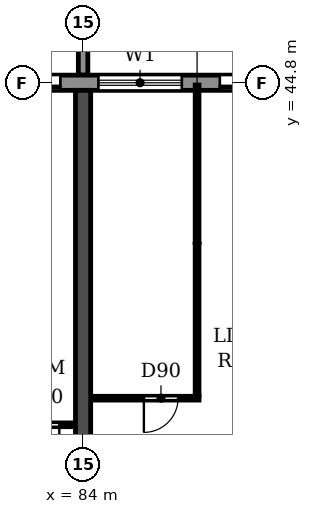
"""IFC4 building model, lengths in metres.
Left out: names, types, materials, properties, quantities, classifications, styles, units other than length and angle.
Written with IfcOpenShell. Run it as: python <this file> out.ifc"""

import sys

from ifc_helpers import new_model, si_unit, direction, frame, frame_2d, origin, place, context, subcontext, project, spatial, polyline, rectangle, outline, extrude, source, transform, mapped, element, fill, save


model = new_model("IFC4")
c1 = context("Model", 3, precision=1e-05, world=origin(), true_north=direction((0.0, 1.0)))
c2 = subcontext(c1, "Body", "Model", "MODEL_VIEW")
j1 = project(units=[si_unit("LENGTHUNIT", "METRE"), si_unit("PLANEANGLEUNIT", "RADIAN")], contexts=[c1])
p1 = place(None, origin())
s1 = spatial("IfcSite", under=j1, at=p1, CompositionType="ELEMENT")
p2 = place(p1, origin())
s2 = spatial("IfcBuilding", under=s1, at=p2, CompositionType="ELEMENT")
p3 = place(p2, frame((0.0, 0.0, 33.3)))
s3 = spatial("IfcBuildingStorey", under=s2, at=p3, CompositionType="ELEMENT", Elevation=33.3)
p4 = place(p3, frame((84.0, 30.55, 0.0), z_axis=(0.0, 0.0, 1.0), x_axis=(0.0, 1.0, 0.0)))
e1 = element("IfcWall", 1, at=p4, inside=s3, PredefinedType="SHEAR", context=c2, shape_type="SweptSolid", body=[
    extrude(rectangle(XDim=14.05, YDim=0.4, at=frame_2d((7.025, 0.0))), origin(), (0.0, 0.0, 1.0), 3.05),
])
p5 = place(p3, frame((97.317, 44.8, 0.0), z_axis=(0.0, 0.0, 1.0), x_axis=(-1.0, 0.0, 0.0)))
e2 = element("IfcWall", 2, at=p5, inside=s3, PredefinedType="STANDARD", context=c2, shape_type="SweptSolid", body=[
    extrude(rectangle(XDim=92.634, YDim=0.4, at=frame_2d((46.317, 0.0))), origin(), (0.0, 0.0, 1.0), 3.05),
])
p6 = place(p5, frame((88.717, 0.0, 0.9)))
e3 = element("IfcOpeningElement", 3, at=p6, cuts=e2, PredefinedType="OPENING", context=c2, shape_type="SweptSolid", body=[
    extrude(rectangle(XDim=2.2, YDim=1.5, at=frame_2d((1.1, 0.75))), frame((0.0, 0.21, 0.0), z_axis=(0.0, -1.0, 0.0), x_axis=(1.0, 0.0, 0.0)), (0.0, 0.0, 1.0), 0.42),
])
p7 = place(p5, frame((85.917, 0.0, 0.0)))
e4 = element("IfcOpeningElement", 4, at=p7, cuts=e2, PredefinedType="OPENING", context=c2, shape_type="SweptSolid", body=[
    extrude(rectangle(XDim=1.8, YDim=2.4, at=frame_2d((0.9, 1.2))), frame((0.0, 0.21, 0.0), z_axis=(0.0, -1.0, 0.0), x_axis=(1.0, 0.0, 0.0)), (0.0, 0.0, 1.0), 0.42),
])
p8 = place(p5, frame((82.717, 0.0, 0.9)))
e5 = element("IfcOpeningElement", 5, at=p8, cuts=e2, PredefinedType="OPENING", context=c2, shape_type="SweptSolid", body=[
    extrude(rectangle(XDim=2.2, YDim=1.5, at=frame_2d((1.1, 0.75))), frame((0.0, 0.21, 0.0), z_axis=(0.0, -1.0, 0.0), x_axis=(1.0, 0.0, 0.0)), (0.0, 0.0, 1.0), 0.42),
])
p9 = place(p5, frame((79.917, 0.0, 0.0)))
e6 = element("IfcOpeningElement", 6, at=p9, cuts=e2, PredefinedType="OPENING", context=c2, shape_type="SweptSolid", body=[
    extrude(rectangle(XDim=1.8, YDim=2.4, at=frame_2d((0.9, 1.2))), frame((0.0, 0.21, 0.0), z_axis=(0.0, -1.0, 0.0), x_axis=(1.0, 0.0, 0.0)), (0.0, 0.0, 1.0), 0.42),
])
p10 = place(p5, frame((76.717, 0.0, 0.9)))
e7 = element("IfcOpeningElement", 7, at=p10, cuts=e2, PredefinedType="OPENING", context=c2, shape_type="SweptSolid", body=[
    extrude(rectangle(XDim=2.2, YDim=1.5, at=frame_2d((1.1, 0.75))), frame((0.0, 0.21, 0.0), z_axis=(0.0, -1.0, 0.0), x_axis=(1.0, 0.0, 0.0)), (0.0, 0.0, 1.0), 0.42),
])
p11 = place(p5, frame((73.717, 0.0, 0.9)))
e8 = element("IfcOpeningElement", 8, at=p11, cuts=e2, PredefinedType="OPENING", context=c2, shape_type="SweptSolid", body=[
    extrude(rectangle(XDim=2.2, YDim=1.5, at=frame_2d((1.1, 0.75))), frame((0.0, 0.21, 0.0), z_axis=(0.0, -1.0, 0.0), x_axis=(1.0, 0.0, 0.0)), (0.0, 0.0, 1.0), 0.42),
])
p12 = place(p5, frame((70.717, 0.0, 0.9)))
e9 = element("IfcOpeningElement", 9, at=p12, cuts=e2, PredefinedType="OPENING", context=c2, shape_type="SweptSolid", body=[
    extrude(rectangle(XDim=2.2, YDim=1.5, at=frame_2d((1.1, 0.75))), frame((0.0, 0.21, 0.0), z_axis=(0.0, -1.0, 0.0), x_axis=(1.0, 0.0, 0.0)), (0.0, 0.0, 1.0), 0.42),
])
p13 = place(p5, frame((67.917, 0.0, 0.0)))
e10 = element("IfcOpeningElement", 10, at=p13, cuts=e2, PredefinedType="OPENING", context=c2, shape_type="SweptSolid", body=[
    extrude(rectangle(XDim=1.8, YDim=2.4, at=frame_2d((0.9, 1.2))), frame((0.0, 0.21, 0.0), z_axis=(0.0, -1.0, 0.0), x_axis=(1.0, 0.0, 0.0)), (0.0, 0.0, 1.0), 0.42),
])
p14 = place(p5, frame((64.717, 0.0, 0.9)))
e11 = element("IfcOpeningElement", 11, at=p14, cuts=e2, PredefinedType="OPENING", context=c2, shape_type="SweptSolid", body=[
    extrude(rectangle(XDim=2.2, YDim=1.5, at=frame_2d((1.1, 0.75))), frame((0.0, 0.21, 0.0), z_axis=(0.0, -1.0, 0.0), x_axis=(1.0, 0.0, 0.0)), (0.0, 0.0, 1.0), 0.42),
])
p15 = place(p5, frame((61.717, 0.0, 0.9)))
e12 = element("IfcOpeningElement", 12, at=p15, cuts=e2, PredefinedType="OPENING", context=c2, shape_type="SweptSolid", body=[
    extrude(rectangle(XDim=2.2, YDim=1.5, at=frame_2d((1.1, 0.75))), frame((0.0, 0.21, 0.0), z_axis=(0.0, -1.0, 0.0), x_axis=(1.0, 0.0, 0.0)), (0.0, 0.0, 1.0), 0.42),
])
p16 = place(p5, frame((58.717, 0.0, 0.9)))
e13 = element("IfcOpeningElement", 13, at=p16, cuts=e2, PredefinedType="OPENING", context=c2, shape_type="SweptSolid", body=[
    extrude(rectangle(XDim=2.2, YDim=1.5, at=frame_2d((1.1, 0.75))), frame((0.0, 0.21, 0.0), z_axis=(0.0, -1.0, 0.0), x_axis=(1.0, 0.0, 0.0)), (0.0, 0.0, 1.0), 0.42),
])
p17 = place(p5, frame((55.917, 0.0, 0.0)))
e14 = element("IfcOpeningElement", 14, at=p17, cuts=e2, PredefinedType="OPENING", context=c2, shape_type="SweptSolid", body=[
    extrude(rectangle(XDim=1.8, YDim=2.4, at=frame_2d((0.9, 1.2))), frame((0.0, 0.21, 0.0), z_axis=(0.0, -1.0, 0.0), x_axis=(1.0, 0.0, 0.0)), (0.0, 0.0, 1.0), 0.42),
])
p18 = place(p5, frame((52.717, 0.0, 0.9)))
e15 = element("IfcOpeningElement", 15, at=p18, cuts=e2, PredefinedType="OPENING", context=c2, shape_type="SweptSolid", body=[
    extrude(rectangle(XDim=2.2, YDim=1.5, at=frame_2d((1.1, 0.75))), frame((0.0, 0.21, 0.0), z_axis=(0.0, -1.0, 0.0), x_axis=(1.0, 0.0, 0.0)), (0.0, 0.0, 1.0), 0.42),
])
p19 = place(p5, frame((49.717, 0.0, 0.9)))
e16 = element("IfcOpeningElement", 16, at=p19, cuts=e2, PredefinedType="OPENING", context=c2, shape_type="SweptSolid", body=[
    extrude(rectangle(XDim=2.2, YDim=1.5, at=frame_2d((1.1, 0.75))), frame((0.0, 0.21, 0.0), z_axis=(0.0, -1.0, 0.0), x_axis=(1.0, 0.0, 0.0)), (0.0, 0.0, 1.0), 0.42),
])
p20 = place(p5, frame((46.717, 0.0, 0.9)))
e17 = element("IfcOpeningElement", 17, at=p20, cuts=e2, PredefinedType="OPENING", context=c2, shape_type="SweptSolid", body=[
    extrude(rectangle(XDim=2.2, YDim=1.5, at=frame_2d((1.1, 0.75))), frame((0.0, 0.21, 0.0), z_axis=(0.0, -1.0, 0.0), x_axis=(1.0, 0.0, 0.0)), (0.0, 0.0, 1.0), 0.42),
])
p21 = place(p5, frame((43.917, 0.0, 0.0)))
e18 = element("IfcOpeningElement", 18, at=p21, cuts=e2, PredefinedType="OPENING", context=c2, shape_type="SweptSolid", body=[
    extrude(rectangle(XDim=1.8, YDim=2.4, at=frame_2d((0.9, 1.2))), frame((0.0, 0.21, 0.0), z_axis=(0.0, -1.0, 0.0), x_axis=(1.0, 0.0, 0.0)), (0.0, 0.0, 1.0), 0.42),
])
p22 = place(p5, frame((40.717, 0.0, 0.9)))
e19 = element("IfcOpeningElement", 19, at=p22, cuts=e2, PredefinedType="OPENING", context=c2, shape_type="SweptSolid", body=[
    extrude(rectangle(XDim=2.2, YDim=1.5, at=frame_2d((1.1, 0.75))), frame((0.0, 0.21, 0.0), z_axis=(0.0, -1.0, 0.0), x_axis=(1.0, 0.0, 0.0)), (0.0, 0.0, 1.0), 0.42),
])
p23 = place(p5, frame((37.717, 0.0, 0.9)))
e20 = element("IfcOpeningElement", 20, at=p23, cuts=e2, PredefinedType="OPENING", context=c2, shape_type="SweptSolid", body=[
    extrude(rectangle(XDim=2.2, YDim=1.5, at=frame_2d((1.1, 0.75))), frame((0.0, 0.21, 0.0), z_axis=(0.0, -1.0, 0.0), x_axis=(1.0, 0.0, 0.0)), (0.0, 0.0, 1.0), 0.42),
])
p24 = place(p5, frame((34.717, 0.0, 0.9)))
e21 = element("IfcOpeningElement", 21, at=p24, cuts=e2, PredefinedType="OPENING", context=c2, shape_type="SweptSolid", body=[
    extrude(rectangle(XDim=2.2, YDim=1.5, at=frame_2d((1.1, 0.75))), frame((0.0, 0.21, 0.0), z_axis=(0.0, -1.0, 0.0), x_axis=(1.0, 0.0, 0.0)), (0.0, 0.0, 1.0), 0.42),
])
p25 = place(p5, frame((31.917, 0.0, 0.0)))
e22 = element("IfcOpeningElement", 22, at=p25, cuts=e2, PredefinedType="OPENING", context=c2, shape_type="SweptSolid", body=[
    extrude(rectangle(XDim=1.8, YDim=2.4, at=frame_2d((0.9, 1.2))), frame((0.0, 0.21, 0.0), z_axis=(0.0, -1.0, 0.0), x_axis=(1.0, 0.0, 0.0)), (0.0, 0.0, 1.0), 0.42),
])
p26 = place(p5, frame((28.717, 0.0, 0.9)))
e23 = element("IfcOpeningElement", 23, at=p26, cuts=e2, PredefinedType="OPENING", context=c2, shape_type="SweptSolid", body=[
    extrude(rectangle(XDim=2.2, YDim=1.5, at=frame_2d((1.1, 0.75))), frame((0.0, 0.21, 0.0), z_axis=(0.0, -1.0, 0.0), x_axis=(1.0, 0.0, 0.0)), (0.0, 0.0, 1.0), 0.42),
])
p27 = place(p5, frame((25.717, 0.0, 0.9)))
e24 = element("IfcOpeningElement", 24, at=p27, cuts=e2, PredefinedType="OPENING", context=c2, shape_type="SweptSolid", body=[
    extrude(rectangle(XDim=2.2, YDim=1.5, at=frame_2d((1.1, 0.75))), frame((0.0, 0.21, 0.0), z_axis=(0.0, -1.0, 0.0), x_axis=(1.0, 0.0, 0.0)), (0.0, 0.0, 1.0), 0.42),
])
p28 = place(p5, frame((22.917, 0.0, 0.0)))
e25 = element("IfcOpeningElement", 25, at=p28, cuts=e2, PredefinedType="OPENING", context=c2, shape_type="SweptSolid", body=[
    extrude(rectangle(XDim=1.8, YDim=2.4, at=frame_2d((0.9, 1.2))), frame((0.0, 0.21, 0.0), z_axis=(0.0, -1.0, 0.0), x_axis=(1.0, 0.0, 0.0)), (0.0, 0.0, 1.0), 0.42),
])
p29 = place(p5, frame((19.717, 0.0, 0.9)))
e26 = element("IfcOpeningElement", 26, at=p29, cuts=e2, PredefinedType="OPENING", context=c2, shape_type="SweptSolid", body=[
    extrude(rectangle(XDim=2.2, YDim=1.5, at=frame_2d((1.1, 0.75))), frame((0.0, 0.21, 0.0), z_axis=(0.0, -1.0, 0.0), x_axis=(1.0, 0.0, 0.0)), (0.0, 0.0, 1.0), 0.42),
])
p30 = place(p5, frame((16.717, 0.0, 0.9)))
e27 = element("IfcOpeningElement", 27, at=p30, cuts=e2, PredefinedType="OPENING", context=c2, shape_type="SweptSolid", body=[
    extrude(rectangle(XDim=2.2, YDim=1.5, at=frame_2d((1.1, 0.75))), frame((0.0, 0.21, 0.0), z_axis=(0.0, -1.0, 0.0), x_axis=(1.0, 0.0, 0.0)), (0.0, 0.0, 1.0), 0.42),
])
p31 = place(p5, frame((13.917, 0.0, 0.0)))
e28 = element("IfcOpeningElement", 28, at=p31, cuts=e2, PredefinedType="OPENING", context=c2, shape_type="SweptSolid", body=[
    extrude(rectangle(XDim=1.8, YDim=2.4, at=frame_2d((0.9, 1.2))), frame((0.0, 0.21, 0.0), z_axis=(0.0, -1.0, 0.0), x_axis=(1.0, 0.0, 0.0)), (0.0, 0.0, 1.0), 0.42),
])
p32 = place(p5, frame((10.717, 0.0, 0.9)))
e29 = element("IfcOpeningElement", 29, at=p32, cuts=e2, PredefinedType="OPENING", context=c2, shape_type="SweptSolid", body=[
    extrude(rectangle(XDim=2.2, YDim=1.5, at=frame_2d((1.1, 0.75))), frame((0.0, 0.21, 0.0), z_axis=(0.0, -1.0, 0.0), x_axis=(1.0, 0.0, 0.0)), (0.0, 0.0, 1.0), 0.42),
])
p33 = place(p5, frame((7.917, 0.0, 0.0)))
e30 = element("IfcOpeningElement", 30, at=p33, cuts=e2, PredefinedType="OPENING", context=c2, shape_type="SweptSolid", body=[
    extrude(rectangle(XDim=1.8, YDim=2.4, at=frame_2d((0.9, 1.2))), frame((0.0, 0.21, 0.0), z_axis=(0.0, -1.0, 0.0), x_axis=(1.0, 0.0, 0.0)), (0.0, 0.0, 1.0), 0.42),
])
p34 = place(p5, frame((4.717, 0.0, 0.9)))
e31 = element("IfcOpeningElement", 31, at=p34, cuts=e2, PredefinedType="OPENING", context=c2, shape_type="SweptSolid", body=[
    extrude(rectangle(XDim=2.2, YDim=1.5, at=frame_2d((1.1, 0.75))), frame((0.0, 0.21, 0.0), z_axis=(0.0, -1.0, 0.0), x_axis=(1.0, 0.0, 0.0)), (0.0, 0.0, 1.0), 0.42),
])
p35 = place(p5, frame((1.917, 0.0, 0.0)))
e32 = element("IfcOpeningElement", 32, at=p35, cuts=e2, PredefinedType="OPENING", context=c2, shape_type="SweptSolid", body=[
    extrude(rectangle(XDim=1.8, YDim=2.4, at=frame_2d((0.9, 1.2))), frame((0.0, 0.21, 0.0), z_axis=(0.0, -1.0, 0.0), x_axis=(1.0, 0.0, 0.0)), (0.0, 0.0, 1.0), 0.42),
])
m1 = source(origin(), c2, "Body", "SweptSolid", [
    extrude(outline(polyline([(0.0, 0.0), (0.25, 0.0), (0.25, 3.1), (0.0, 3.1), (0.0, 0.0)])), origin(), (0.0, 0.0, 1.0), 3.1),
])
p36 = place(p3, frame((83.875, 45.0, 0.0)))
e33 = element("IfcWall", 33, at=p36, inside=s3, PredefinedType="STANDARD", context=c2, shape_type="MappedRepresentation", body=[
    mapped(m1, transform((0.0, 0.0, 0.0))),
])
p37 = place(p3, frame((81.9, 35.8, 0.0), z_axis=(0.0, 0.0, 1.0), x_axis=(1.0, 0.0, 0.0)))
e34 = element("IfcWall", 34, at=p37, inside=s3, PredefinedType="PARTITIONING", context=c2, shape_type="SweptSolid", body=[
    extrude(rectangle(XDim=1.89, YDim=0.1, at=frame_2d((0.945, 0.0))), origin(), (0.0, 0.0, 1.0), 3.05),
])
p38 = place(p37, frame((0.675, 0.0, 0.0)))
e35 = element("IfcOpeningElement", 35, at=p38, cuts=e34, PredefinedType="OPENING", context=c2, shape_type="SweptSolid", body=[
    extrude(rectangle(XDim=0.8, YDim=2.1, at=frame_2d((0.4, 1.05))), frame((0.0, 0.06, 0.0), z_axis=(0.0, -1.0, 0.0), x_axis=(1.0, 0.0, 0.0)), (0.0, 0.0, 1.0), 0.12),
])
p39 = place(p3, frame((84.21, 36.5, 0.0), z_axis=(0.0, 0.0, 1.0), x_axis=(1.0, 0.0, 0.0)))
e36 = element("IfcWall", 36, at=p39, inside=s3, PredefinedType="PARTITIONING", context=c2, shape_type="SweptSolid", body=[
    extrude(rectangle(XDim=2.84, YDim=0.1, at=frame_2d((1.42, 0.0))), origin(), (0.0, 0.0, 1.0), 3.05),
])
p40 = place(p39, frame((1.39, 0.0, 0.0)))
e37 = element("IfcOpeningElement", 37, at=p40, cuts=e36, PredefinedType="OPENING", context=c2, shape_type="SweptSolid", body=[
    extrude(rectangle(XDim=0.9, YDim=2.1, at=frame_2d((0.45, 1.05))), frame((0.0, 0.06, 0.0), z_axis=(0.0, -1.0, 0.0), x_axis=(1.0, 0.0, 0.0)), (0.0, 0.0, 1.0), 0.12),
])
p41 = place(p3, frame((87.0, 36.55, 0.0), z_axis=(0.0, 0.0, 1.0), x_axis=(0.0, 1.0, 0.0)))
e38 = element("IfcWall", 38, at=p41, inside=s3, PredefinedType="PARTITIONING", context=c2, shape_type="SweptSolid", body=[
    extrude(rectangle(XDim=8.19, YDim=0.1, at=frame_2d((4.095, 0.0))), origin(), (0.0, 0.0, 1.0), 3.05),
])
p42 = place(p31, origin())
e39 = element("IfcDoor", 39, at=p42, inside=s3, OperationType="DOUBLE_DOOR_SLIDING", PredefinedType="DOOR", context=c2, shape_type="SweptSolid", body=[
    extrude(rectangle(XDim=1.8, YDim=2.4, at=frame_2d((0.9, 1.2))), frame((0.0, 0.025, 0.0), z_axis=(0.0, -1.0, 0.0), x_axis=(1.0, 0.0, 0.0)), (0.0, 0.0, 1.0), 0.05),
])
fill(e28, e39)
p43 = place(p32, origin())
e40 = element("IfcWindow", 40, at=p43, inside=s3, PartitioningType="DOUBLE_PANEL_HORIZONTAL", PredefinedType="WINDOW", context=c2, shape_type="SweptSolid", body=[
    extrude(rectangle(XDim=2.2, YDim=1.5, at=frame_2d((1.1, 0.75))), frame((0.0, 0.03, 0.0), z_axis=(0.0, -1.0, 0.0), x_axis=(1.0, 0.0, 0.0)), (0.0, 0.0, 1.0), 0.06),
])
fill(e29, e40)
p44 = place(p33, origin())
e41 = element("IfcDoor", 41, at=p44, inside=s3, OperationType="DOUBLE_DOOR_SLIDING", PredefinedType="DOOR", context=c2, shape_type="SweptSolid", body=[
    extrude(rectangle(XDim=1.8, YDim=2.4, at=frame_2d((0.9, 1.2))), frame((0.0, 0.025, 0.0), z_axis=(0.0, -1.0, 0.0), x_axis=(1.0, 0.0, 0.0)), (0.0, 0.0, 1.0), 0.05),
])
fill(e30, e41)
p45 = place(p38, frame((0.8, 0.0, 0.0), z_axis=(0.0, 0.0, 1.0), x_axis=(-1.0, 0.0, 0.0)))
e42 = element("IfcDoor", 42, at=p45, inside=s3, OperationType="SINGLE_SWING_LEFT", PredefinedType="DOOR", context=c2, shape_type="SweptSolid", body=[
    extrude(rectangle(XDim=0.8, YDim=2.1, at=frame_2d((0.4, 1.05))), frame((0.0, 0.025, 0.0), z_axis=(0.0, -1.0, 0.0), x_axis=(1.0, 0.0, 0.0)), (0.0, 0.0, 1.0), 0.05),
])
fill(e35, e42)
p46 = place(p40, frame((0.9, 0.0, 0.0), z_axis=(0.0, 0.0, 1.0), x_axis=(-1.0, 0.0, 0.0)))
e43 = element("IfcDoor", 43, at=p46, inside=s3, OperationType="SINGLE_SWING_RIGHT", PredefinedType="DOOR", context=c2, shape_type="SweptSolid", body=[
    extrude(rectangle(XDim=0.9, YDim=2.1, at=frame_2d((0.45, 1.05))), frame((0.0, 0.025, 0.0), z_axis=(0.0, -1.0, 0.0), x_axis=(1.0, 0.0, 0.0)), (0.0, 0.0, 1.0), 0.05),
])
fill(e37, e43)
save(model, sys.argv[1])
